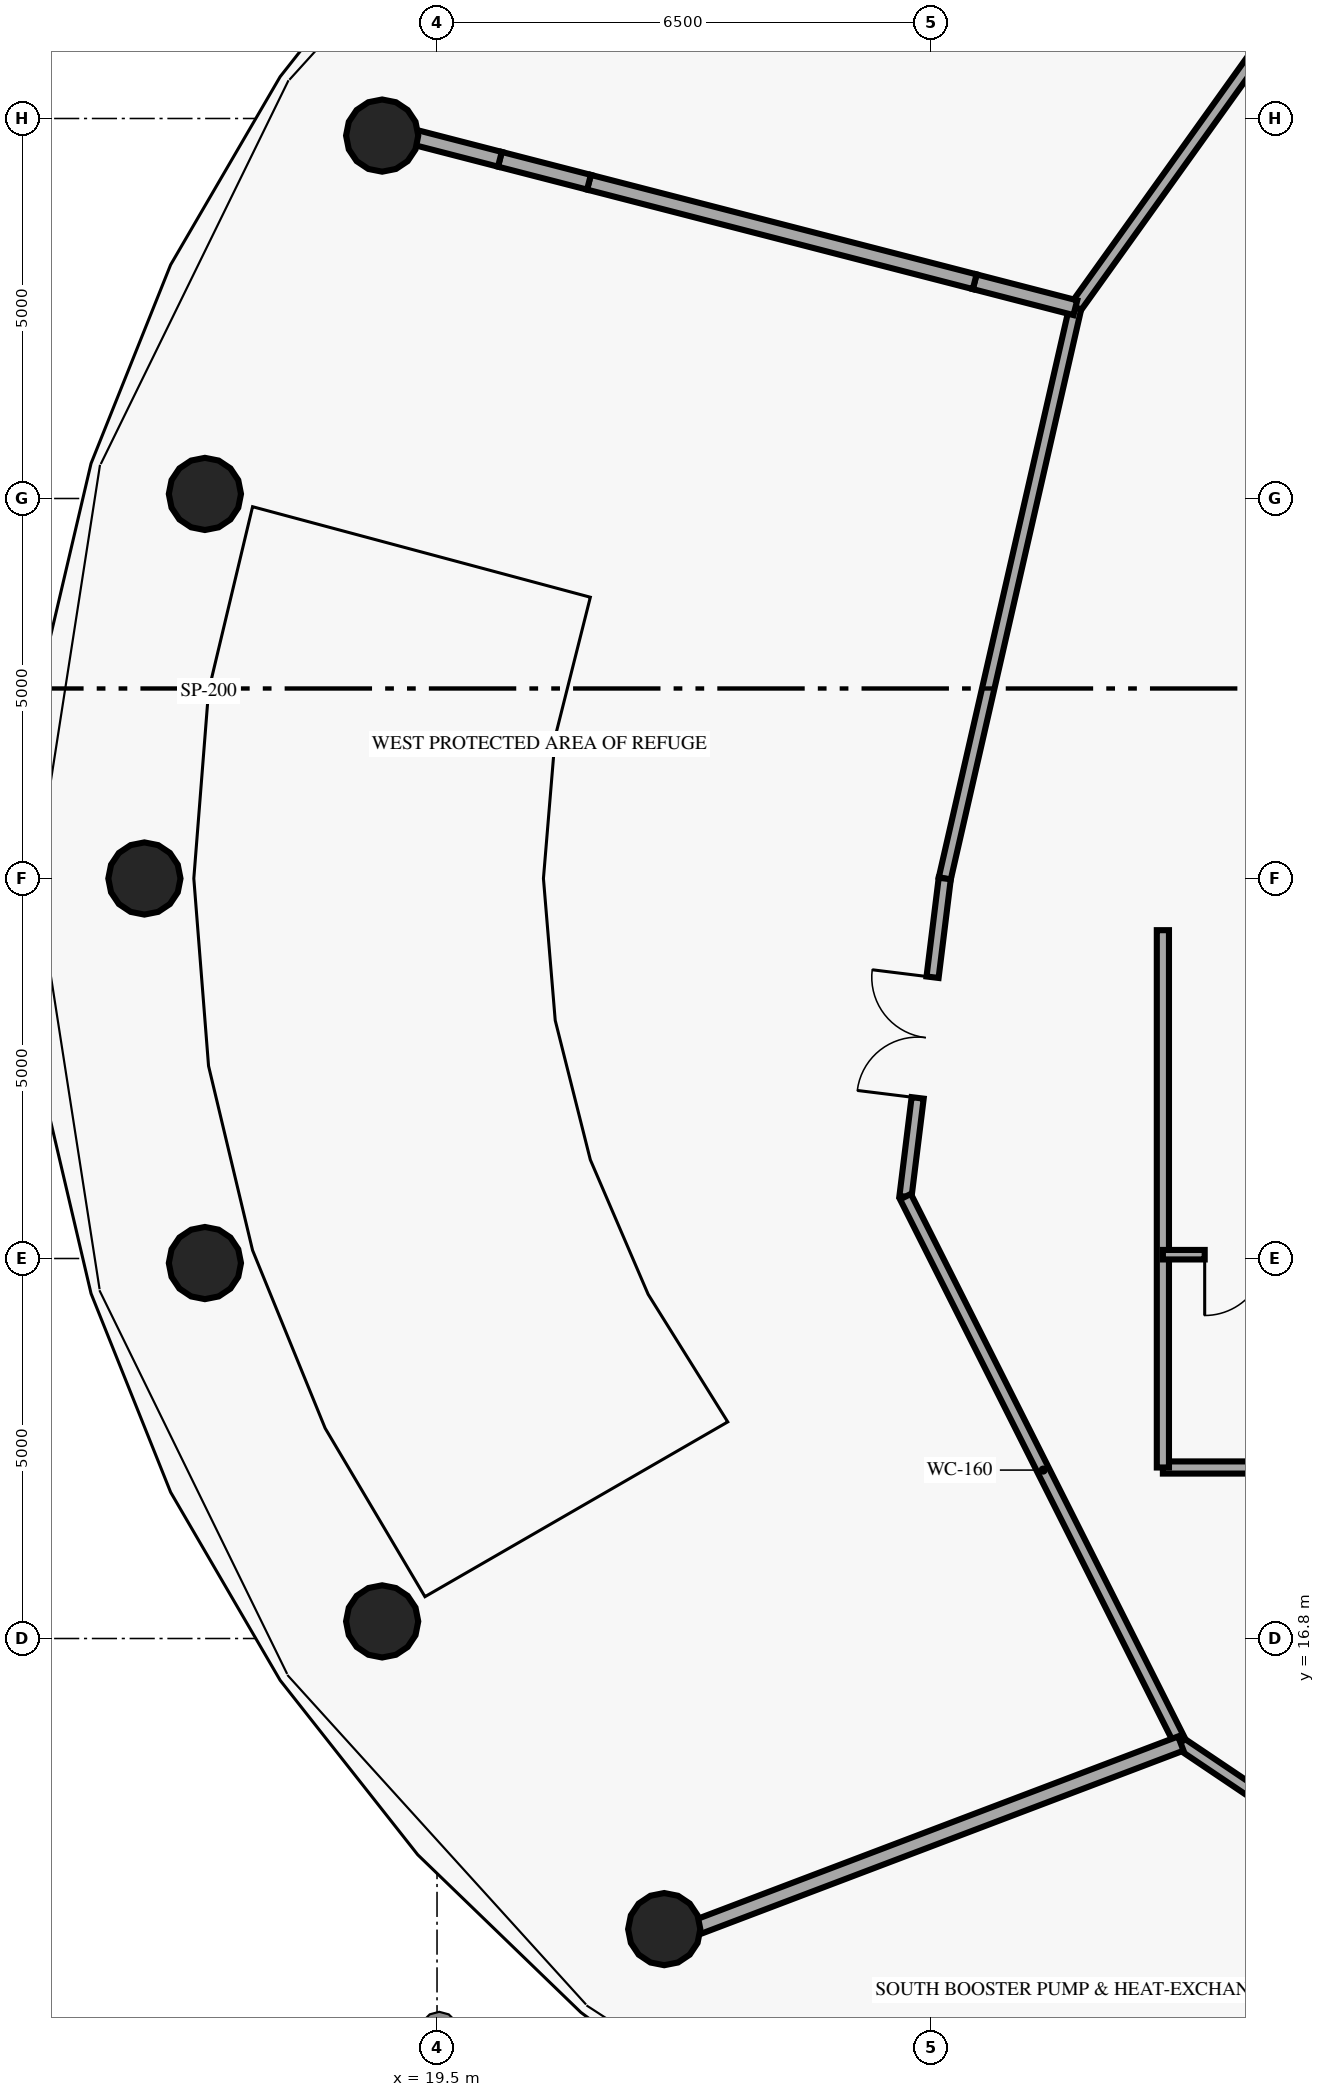
"""IFC4 building model, lengths in metres.
Left out: names, types, materials, properties, quantities, classifications, styles, units other than length and angle.
Written with IfcOpenShell. Run it as: python <this file> out.ifc"""

import sys

from ifc_helpers import new_model, si_unit, direction, frame, frame_2d, origin, origin_2d, place, context, subcontext, project, spatial, rectangle, circle, extrude, element, fill, save


model = new_model("IFC4")
c1 = context("Model", 3, precision=1e-05, world=origin(), true_north=direction((0.0, 1.0)))
c2 = subcontext(c1, "Body", "Model", "MODEL_VIEW")
j1 = project(units=[si_unit("LENGTHUNIT", "METRE"), si_unit("PLANEANGLEUNIT", "RADIAN")], contexts=[c1])
p1 = place(None, origin())
s1 = spatial("IfcSite", under=j1, at=p1, CompositionType="ELEMENT")
p2 = place(p1, origin())
s2 = spatial("IfcBuilding", under=s1, at=p2, CompositionType="ELEMENT")
p3 = place(p2, frame((0.0, 0.0, 195.95)))
s3 = spatial("IfcBuildingStorey", under=s2, at=p3, CompositionType="ELEMENT", Elevation=195.95)
for number, where, z_axis, x_axis in (
    (1, (18.778, 36.575, 0.0), (0.0, 0.0, 1.0), (1.0, 0.0, 0.0)),
    (2, (16.446, 31.86, 0.0), (0.0, 0.0, 1.0), (1.0, 0.0, 0.0)),
    (3, (15.65, 26.8, 0.0), (0.0, 0.0, 1.0), (1.0, 0.0, 0.0)),
    (4, (16.446, 21.74, 0.0), (0.0, 0.0, 1.0), (1.0, 0.0, 0.0)),
    (5, (18.778, 17.025, 0.0), (0.0, 0.0, 1.0), (1.0, 0.0, 0.0)),
    (6, (22.489, 12.976, 0.0), (0.0, 0.0, 1.0), (1.0, 0.0, 0.0)),
):
    element("IfcColumn", number, at=place(p3, frame(where, z_axis=z_axis, x_axis=x_axis)), inside=s3, PredefinedType="COLUMN", context=c2, shape_type="SweptSolid", body=[
        extrude(circle(Radius=0.475, at=origin_2d()), origin(), (0.0, 0.0, 1.0), 6.88),
    ])
p4 = place(p3, frame((29.05, 19.05, 0.0), z_axis=(0.0, 0.0, 1.0), x_axis=(1.0, 0.0, 0.0)))
e7 = element("IfcWall", 7, at=p4, inside=s3, PredefinedType="PARTITIONING", context=c2, shape_type="SweptSolid", body=[
    extrude(rectangle(XDim=4.65, YDim=0.16, at=frame_2d((2.325, 0.0))), origin(), (0.0, 0.0, 1.0), 6.88),
])
p5 = place(p3, frame((29.05, 19.05, 0.0), z_axis=(0.0, 0.0, 1.0), x_axis=(0.0, 1.0, 0.0)))
e8 = element("IfcWall", 8, at=p5, inside=s3, PredefinedType="PARTITIONING", context=c2, shape_type="SweptSolid", body=[
    extrude(rectangle(XDim=7.07, YDim=0.16, at=frame_2d((3.535, 0.0))), origin(), (0.0, 0.0, 1.0), 6.88),
])
p6 = place(p3, frame((33.6, 21.85, 0.0), z_axis=(0.0, 0.0, 1.0), x_axis=(-1.0, 0.0, 0.0)))
e9 = element("IfcWall", 9, at=p6, inside=s3, PredefinedType="PARTITIONING", context=c2, shape_type="SweptSolid", body=[
    extrude(rectangle(XDim=4.55, YDim=0.125, at=frame_2d((2.275, 0.0))), origin(), (0.0, 0.0, 1.0), 6.88),
])
p7 = place(p6, frame((3.2, 0.0, 0.0)))
e10 = element("IfcOpeningElement", 10, at=p7, cuts=e9, PredefinedType="OPENING", context=c2, shape_type="SweptSolid", body=[
    extrude(rectangle(XDim=0.8, YDim=2.05, at=frame_2d((0.4, 1.025))), frame((0.0, 0.073, 0.0), z_axis=(0.0, -1.0, 0.0), x_axis=(1.0, 0.0, 0.0)), (0.0, 0.0, 1.0), 0.145),
])
p8 = place(p6, frame((1.0, 0.0, 0.0)))
e11 = element("IfcOpeningElement", 11, at=p8, cuts=e9, PredefinedType="OPENING", context=c2, shape_type="SweptSolid", body=[
    extrude(rectangle(XDim=0.8, YDim=2.05, at=frame_2d((0.4, 1.025))), frame((0.0, 0.073, 0.0), z_axis=(0.0, -1.0, 0.0), x_axis=(1.0, 0.0, 0.0)), (0.0, 0.0, 1.0), 0.145),
])
p9 = place(p3, frame((32.281, 40.436, 0.0), z_axis=(0.0, 0.0, 1.0), x_axis=(-0.581884927471, -0.813271130179, 0.0)))
e12 = element("IfcWall", 12, at=p9, inside=s3, PredefinedType="PARTITIONING", context=c2, shape_type="SweptSolid", body=[
    extrude(rectangle(XDim=7.532, YDim=0.16, at=frame_2d((3.766, 0.0))), origin(), (0.0, 0.0, 1.0), 6.88),
])
p10 = place(p3, frame((27.898, 34.31, 0.0), z_axis=(0.0, 0.0, 1.0), x_axis=(-0.223002916051, -0.974817777553, 0.0)))
e13 = element("IfcWall", 13, at=p10, inside=s3, PredefinedType="PARTITIONING", context=c2, shape_type="SweptSolid", body=[
    extrude(rectangle(XDim=7.704, YDim=0.16, at=frame_2d((3.852, 0.0))), origin(), (0.0, 0.0, 1.0), 6.88),
])
p11 = place(p3, frame((25.663, 22.614, 0.0), z_axis=(0.0, 0.0, 1.0), x_axis=(0.122538537921, 0.992463755874, 0.0)))
e14 = element("IfcWall", 14, at=p11, inside=s3, PredefinedType="PARTITIONING", context=c2, shape_type="SweptSolid", body=[
    extrude(rectangle(XDim=4.218, YDim=0.16, at=frame_2d((2.109, 0.0))), origin(), (0.0, 0.0, 1.0), 6.88),
])
p12 = place(p11, frame((1.309, 0.0, 0.0)))
e15 = element("IfcOpeningElement", 15, at=p12, cuts=e14, PredefinedType="OPENING", context=c2, shape_type="SweptSolid", body=[
    extrude(rectangle(XDim=1.6, YDim=2.2, at=frame_2d((0.8, 1.1))), frame((0.0, 0.09, 0.0), z_axis=(0.0, -1.0, 0.0), x_axis=(1.0, 0.0, 0.0)), (0.0, 0.0, 1.0), 0.18),
])
p13 = place(p3, frame((25.663, 22.614, 0.0), z_axis=(0.0, 0.0, 1.0), x_axis=(0.449672541353, -0.893193487187, 0.0)))
e16 = element("IfcWall", 16, at=p13, inside=s3, PredefinedType="PARTITIONING", context=c2, shape_type="SweptSolid", body=[
    extrude(rectangle(XDim=8.057, YDim=0.16, at=frame_2d((4.028, 0.0))), origin(), (0.0, 0.0, 1.0), 6.88),
])
p14 = place(p3, frame((29.286, 15.418, 0.0), z_axis=(0.0, 0.0, 1.0), x_axis=(0.829606474383, -0.558348544962, 0.0)))
e17 = element("IfcWall", 17, at=p14, inside=s3, PredefinedType="PARTITIONING", context=c2, shape_type="SweptSolid", body=[
    extrude(rectangle(XDim=3.716, YDim=0.16, at=frame_2d((1.858, 0.0))), origin(), (0.0, 0.0, 1.0), 6.88),
])
p15 = place(p3, frame((27.898, 34.31, 0.0), z_axis=(0.0, 0.0, 1.0), x_axis=(-0.968211797472, 0.250131795733, 0.0)))
e18 = element("IfcWall", 18, at=p15, inside=s3, PredefinedType="SOLIDWALL", context=c2, shape_type="SweptSolid", body=[
    extrude(rectangle(XDim=1.367, YDim=0.2, at=frame_2d((0.684, 0.0))), origin(), (0.0, 0.0, 1.0), 6.88),
])
p16 = place(p3, frame((26.574, 34.652, 0.0), z_axis=(0.0, 0.0, 1.0), x_axis=(-0.968315487536, 0.249730087491, 0.0)))
e19 = element("IfcWall", 19, at=p16, inside=s3, PredefinedType="SOLIDWALL", context=c2, shape_type="SweptSolid", body=[
    extrude(rectangle(XDim=5.241, YDim=0.2, at=frame_2d((2.621, 0.0))), origin(), (0.0, 0.0, 1.0), 5.43),
])
p17 = place(p3, frame((21.499, 35.961, 0.0), z_axis=(0.0, 0.0, 1.0), x_axis=(-0.968373282232, 0.249505884216, 0.0)))
e20 = element("IfcWall", 20, at=p17, inside=s3, PredefinedType="SOLIDWALL", context=c2, shape_type="SweptSolid", body=[
    extrude(rectangle(XDim=1.21, YDim=0.2, at=frame_2d((0.605, 0.0))), origin(), (0.0, 0.0, 1.0), 6.88),
])
p18 = place(p3, frame((20.327, 36.263, 0.0), z_axis=(0.0, 0.0, 1.0), x_axis=(-0.968266176434, 0.249921210732, 0.0)))
e21 = element("IfcWall", 21, at=p18, inside=s3, PredefinedType="SOLIDWALL", context=c2, shape_type="SweptSolid", body=[
    extrude(rectangle(XDim=1.88, YDim=0.2, at=frame_2d((0.94, 0.0))), origin(), (0.0, 0.0, 1.0), 5.53),
])
p19 = place(p3, frame((29.286, 15.418, 0.0), z_axis=(0.0, 0.0, 1.0), x_axis=(-0.934893013083, -0.354929646674, 0.0)))
e22 = element("IfcWall", 22, at=p19, inside=s3, PredefinedType="SOLIDWALL", context=c2, shape_type="SweptSolid", body=[
    extrude(rectangle(XDim=7.509, YDim=0.2, at=frame_2d((3.754, 0.0))), origin(), (0.0, 0.0, 1.0), 6.88),
])
p20 = place(p7, origin())
e23 = element("IfcDoor", 23, at=p20, inside=s3, OperationType="SINGLE_SWING_RIGHT", PredefinedType="DOOR", context=c2, shape_type="SweptSolid", body=[
    extrude(rectangle(XDim=0.8, YDim=2.05, at=frame_2d((0.4, 1.025))), frame((0.0, 0.025, 0.0), z_axis=(0.0, -1.0, 0.0), x_axis=(1.0, 0.0, 0.0)), (0.0, 0.0, 1.0), 0.05),
])
fill(e10, e23)
p21 = place(p12, origin())
e24 = element("IfcDoor", 24, at=p21, inside=s3, OperationType="DOUBLE_DOOR_SINGLE_SWING", PredefinedType="DOOR", context=c2, shape_type="SweptSolid", body=[
    extrude(rectangle(XDim=1.6, YDim=2.2, at=frame_2d((0.8, 1.1))), frame((0.0, 0.025, 0.0), z_axis=(0.0, -1.0, 0.0), x_axis=(1.0, 0.0, 0.0)), (0.0, 0.0, 1.0), 0.05),
])
fill(e15, e24)
save(model, sys.argv[1])
